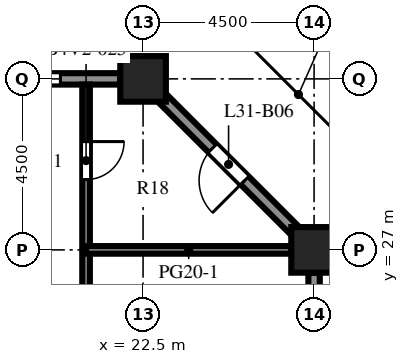
"""IFC4 building model, lengths in metres.
Left out: names, types, materials, properties, quantities, classifications, styles, units other than length and angle.
Written with IfcOpenShell. Run it as: python <this file> out.ifc"""

import sys

from ifc_helpers import new_model, si_unit, direction, frame, frame_2d, origin, origin_2d, place, context, subcontext, project, spatial, rectangle, extrude, element, fill, save


model = new_model("IFC4")
c1 = context("Model", 3, precision=1e-05, world=origin(), true_north=direction((0.0, 1.0)))
c2 = subcontext(c1, "Body", "Model", "MODEL_VIEW")
j1 = project(units=[si_unit("LENGTHUNIT", "METRE"), si_unit("PLANEANGLEUNIT", "RADIAN")], contexts=[c1])
p1 = place(None, origin())
s1 = spatial("IfcSite", under=j1, at=p1, CompositionType="ELEMENT")
p2 = place(p1, origin())
s2 = spatial("IfcBuilding", under=s1, at=p2, CompositionType="ELEMENT")
p3 = place(p2, frame((0.0, 0.0, 137.2)))
s3 = spatial("IfcBuildingStorey", under=s2, at=p3, CompositionType="ELEMENT", Elevation=137.2)
for number, where, z_axis, x_axis in (
    (1, (22.5, 31.5, 0.0), (0.0, 0.0, 1.0), (1.0, 0.0, 0.0)),
    (2, (27.0, 27.0, 0.0), (0.0, 0.0, 1.0), (1.0, 0.0, 0.0)),
):
    element("IfcColumn", number, at=place(p3, frame(where, z_axis=z_axis, x_axis=x_axis)), inside=s3, PredefinedType="COLUMN", context=c2, shape_type="SweptSolid", body=[
        extrude(rectangle(XDim=1.2, YDim=1.2, at=origin_2d()), origin(), (0.0, 0.0, 1.0), 4.1),
    ])
p4 = place(p3, frame((27.0, 26.4, 0.0), z_axis=(0.0, 0.0, 1.0), x_axis=(0.0, -1.0, 0.0)))
e3 = element("IfcWall", 3, at=p4, inside=s3, PredefinedType="SOLIDWALL", context=c2, shape_type="SweptSolid", body=[
    extrude(rectangle(XDim=3.3, YDim=0.3, at=frame_2d((1.65, 0.0))), origin(), (0.0, 0.0, 1.0), 2.75),
])
p5 = place(p4, frame((0.45, 0.0, 0.8)))
e4 = element("IfcOpeningElement", 4, at=p5, cuts=e3, PredefinedType="OPENING", context=c2, shape_type="SweptSolid", body=[
    extrude(rectangle(XDim=2.4, YDim=1.7, at=frame_2d((1.2, 0.85))), frame((0.0, 0.16, 0.0), z_axis=(0.0, -1.0, 0.0), x_axis=(1.0, 0.0, 0.0)), (0.0, 0.0, 1.0), 0.32),
])
p6 = place(p3, frame((22.994, 31.006, 0.0), z_axis=(0.0, 0.0, 1.0), x_axis=(0.707106781187, -0.707106781187, 0.0)))
e5 = element("IfcWall", 5, at=p6, inside=s3, PredefinedType="SOLIDWALL", context=c2, shape_type="SweptSolid", body=[
    extrude(rectangle(XDim=4.967, YDim=0.3, at=frame_2d((2.483, 0.0))), origin(), (0.0, 0.0, 1.0), 2.75),
])
p7 = place(p6, frame((1.884, 0.0, 0.0)))
e6 = element("IfcOpeningElement", 6, at=p7, cuts=e5, PredefinedType="OPENING", context=c2, shape_type="SweptSolid", body=[
    extrude(rectangle(XDim=1.2, YDim=2.2, at=frame_2d((0.6, 1.1))), frame((0.0, 0.16, 0.0), z_axis=(0.0, -1.0, 0.0), x_axis=(1.0, 0.0, 0.0)), (0.0, 0.0, 1.0), 0.32),
])
p8 = place(p3, frame((18.6, 31.5, 0.0), z_axis=(0.0, 0.0, 1.0), x_axis=(1.0, 0.0, 0.0)))
e7 = element("IfcWall", 7, at=p8, inside=s3, PredefinedType="SOLIDWALL", context=c2, shape_type="SweptSolid", body=[
    extrude(rectangle(XDim=3.3, YDim=0.3, at=frame_2d((1.65, 0.0))), origin(), (0.0, 0.0, 1.0), 2.75),
])
p9 = place(p8, frame((0.525, 0.0, 0.8)))
e8 = element("IfcOpeningElement", 8, at=p9, cuts=e7, PredefinedType="OPENING", context=c2, shape_type="SweptSolid", body=[
    extrude(rectangle(XDim=1.2, YDim=1.7, at=frame_2d((0.6, 0.85))), frame((0.0, 0.16, 0.0), z_axis=(0.0, -1.0, 0.0), x_axis=(1.0, 0.0, 0.0)), (0.0, 0.0, 1.0), 0.32),
])
p10 = place(p3, frame((21.0, 31.35, 0.0), z_axis=(0.0, 0.0, 1.0), x_axis=(0.0, -1.0, 0.0)))
e9 = element("IfcWall", 9, at=p10, inside=s3, PredefinedType="PARTITIONING", context=c2, shape_type="SweptSolid", body=[
    extrude(rectangle(XDim=53.7, YDim=0.2, at=frame_2d((26.85, 0.0))), origin(), (0.0, 0.0, 1.0), 3.65),
])
p11 = place(p10, frame((44.75, 0.0, 0.0)))
e10 = element("IfcOpeningElement", 10, at=p11, cuts=e9, PredefinedType="OPENING", context=c2, shape_type="SweptSolid", body=[
    extrude(rectangle(XDim=1.0, YDim=2.1, at=frame_2d((0.5, 1.05))), frame((0.0, 0.11, 0.0), z_axis=(0.0, -1.0, 0.0), x_axis=(1.0, 0.0, 0.0)), (0.0, 0.0, 1.0), 0.22),
])
p12 = place(p10, frame((32.25, 0.0, 0.0)))
e11 = element("IfcOpeningElement", 11, at=p12, cuts=e9, PredefinedType="OPENING", context=c2, shape_type="SweptSolid", body=[
    extrude(rectangle(XDim=1.0, YDim=2.1, at=frame_2d((0.5, 1.05))), frame((0.0, 0.11, 0.0), z_axis=(0.0, -1.0, 0.0), x_axis=(1.0, 0.0, 0.0)), (0.0, 0.0, 1.0), 0.22),
])
p13 = place(p10, frame((20.5, 0.0, 0.0)))
e12 = element("IfcOpeningElement", 12, at=p13, cuts=e9, PredefinedType="OPENING", context=c2, shape_type="SweptSolid", body=[
    extrude(rectangle(XDim=1.0, YDim=2.1, at=frame_2d((0.5, 1.05))), frame((0.0, 0.11, 0.0), z_axis=(0.0, -1.0, 0.0), x_axis=(1.0, 0.0, 0.0)), (0.0, 0.0, 1.0), 0.22),
])
p14 = place(p10, frame((9.75, 0.0, 0.0)))
e13 = element("IfcOpeningElement", 13, at=p14, cuts=e9, PredefinedType="OPENING", context=c2, shape_type="SweptSolid", body=[
    extrude(rectangle(XDim=1.0, YDim=2.1, at=frame_2d((0.5, 1.05))), frame((0.0, 0.11, 0.0), z_axis=(0.0, -1.0, 0.0), x_axis=(1.0, 0.0, 0.0)), (0.0, 0.0, 1.0), 0.22),
])
p15 = place(p10, frame((1.5, 0.0, 0.0)))
e14 = element("IfcOpeningElement", 14, at=p15, cuts=e9, PredefinedType="OPENING", context=c2, shape_type="SweptSolid", body=[
    extrude(rectangle(XDim=1.0, YDim=2.1, at=frame_2d((0.5, 1.05))), frame((0.0, 0.11, 0.0), z_axis=(0.0, -1.0, 0.0), x_axis=(1.0, 0.0, 0.0)), (0.0, 0.0, 1.0), 0.22),
])
p16 = place(p3, frame((21.0, 27.0, 0.0), z_axis=(0.0, 0.0, 1.0), x_axis=(1.0, 0.0, 0.0)))
e15 = element("IfcWall", 15, at=p16, inside=s3, PredefinedType="PARTITIONING", context=c2, shape_type="SweptSolid", body=[
    extrude(rectangle(XDim=5.4, YDim=0.2, at=frame_2d((2.7, 0.0))), origin(), (0.0, 0.0, 1.0), 3.65),
])
p17 = place(p7, origin())
e16 = element("IfcDoor", 16, at=p17, inside=s3, OperationType="SINGLE_SWING_RIGHT", PredefinedType="DOOR", context=c2, shape_type="SweptSolid", body=[
    extrude(rectangle(XDim=1.2, YDim=2.2, at=frame_2d((0.6, 1.1))), frame((0.0, 0.025, 0.0), z_axis=(0.0, -1.0, 0.0), x_axis=(1.0, 0.0, 0.0)), (0.0, 0.0, 1.0), 0.05),
])
fill(e6, e16)
p18 = place(p9, origin())
e17 = element("IfcWindow", 17, at=p18, inside=s3, PartitioningType="SINGLE_PANEL", PredefinedType="WINDOW", context=c2, shape_type="SweptSolid", body=[
    extrude(rectangle(XDim=1.2, YDim=1.7, at=frame_2d((0.6, 0.85))), frame((0.0, 0.03, 0.0), z_axis=(0.0, -1.0, 0.0), x_axis=(1.0, 0.0, 0.0)), (0.0, 0.0, 1.0), 0.06),
])
fill(e8, e17)
p19 = place(p15, origin())
e18 = element("IfcDoor", 18, at=p19, inside=s3, OperationType="SINGLE_SWING_LEFT", PredefinedType="DOOR", context=c2, shape_type="SweptSolid", body=[
    extrude(rectangle(XDim=1.0, YDim=2.1, at=frame_2d((0.5, 1.05))), frame((0.0, 0.025, 0.0), z_axis=(0.0, -1.0, 0.0), x_axis=(1.0, 0.0, 0.0)), (0.0, 0.0, 1.0), 0.05),
])
fill(e14, e18)
save(model, sys.argv[1])
